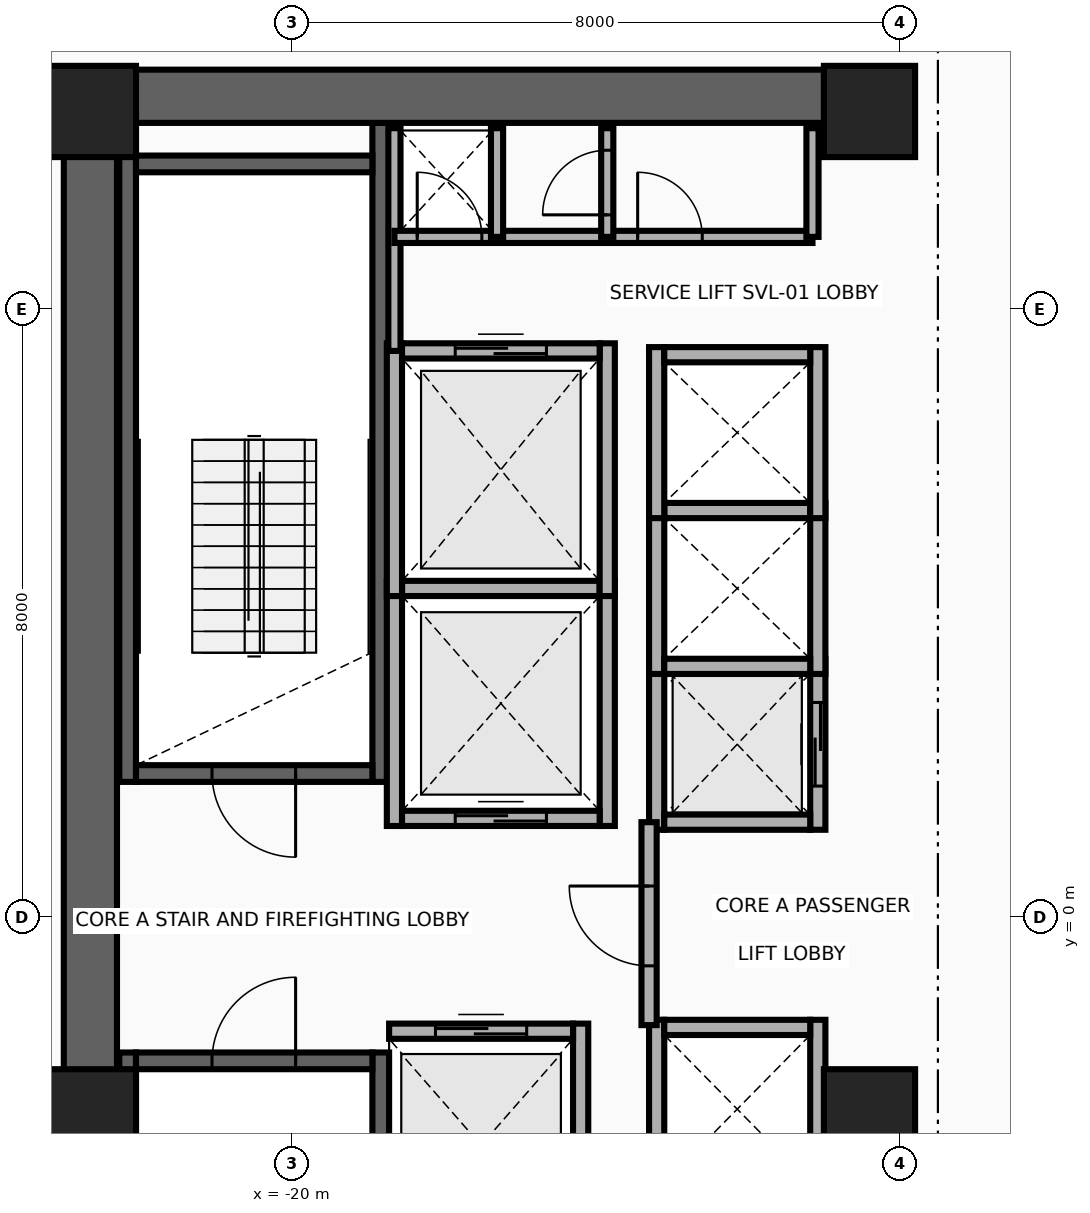
"""IFC4 building model, lengths in metres.
Left out: names, types, materials, properties, quantities, classifications, styles, units other than length and angle.
Written with IfcOpenShell. Run it as: python <this file> out.ifc"""

import sys

from ifc_helpers import new_model, si_unit, direction, frame, frame_2d, origin, origin_2d, place, context, subcontext, project, spatial, rectangle, extrude, source, transform, mapped, element, fill, save


model = new_model("IFC4")
c1 = context("Model", 3, precision=1e-05, world=origin(), true_north=direction((0.0, 1.0)))
c2 = subcontext(c1, "Body", "Model", "MODEL_VIEW")
j1 = project(units=[si_unit("LENGTHUNIT", "METRE"), si_unit("PLANEANGLEUNIT", "RADIAN")], contexts=[c1])
p1 = place(None, origin())
s1 = spatial("IfcSite", under=j1, at=p1, CompositionType="ELEMENT")
p2 = place(p1, origin())
s2 = spatial("IfcBuilding", under=s1, at=p2, CompositionType="ELEMENT")
p3 = place(p2, frame((0.0, 0.0, 135.3)))
s3 = spatial("IfcBuildingStorey", under=s2, at=p3, CompositionType="ELEMENT", Elevation=135.3)
for number, where, z_axis, x_axis in (
    (1, (-22.16, 1.78, 0.0), (0.0, 0.0, 1.0), (0.0, 1.0, 0.0)),
    (2, (-18.83, 1.78, 0.0), (0.0, 0.0, 1.0), (0.0, 1.0, 0.0)),
):
    element("IfcWall", number, at=place(p3, frame(where, z_axis=z_axis, x_axis=x_axis)), inside=s3, PredefinedType="SHEAR", context=c2, shape_type="SweptSolid", body=[
        extrude(rectangle(XDim=8.67, YDim=0.22, at=frame_2d((4.335, 0.0))), origin(), (0.0, 0.0, 1.0), 3.46),
    ])
p4 = place(p3, frame((-22.05, 1.89, 0.0), z_axis=(0.0, 0.0, 1.0), x_axis=(1.0, 0.0, 0.0)))
e3 = element("IfcWall", 3, at=p4, inside=s3, PredefinedType="SHEAR", context=c2, shape_type="SweptSolid", body=[
    extrude(rectangle(XDim=3.11, YDim=0.22, at=frame_2d((1.555, 0.0))), origin(), (0.0, 0.0, 1.0), 3.46),
])
p5 = place(p4, frame((1.0, 0.0, 0.0)))
e4 = element("IfcOpeningElement", 4, at=p5, cuts=e3, PredefinedType="OPENING", context=c2, shape_type="SweptSolid", body=[
    extrude(rectangle(XDim=1.1, YDim=2.15, at=frame_2d((0.55, 1.075))), frame((0.0, 0.125, 0.0), z_axis=(0.0, -1.0, 0.0), x_axis=(1.0, 0.0, 0.0)), (0.0, 0.0, 1.0), 0.25),
])
p6 = place(p3, frame((-22.05, 9.91, 0.0), z_axis=(0.0, 0.0, 1.0), x_axis=(1.0, 0.0, 0.0)))
e5 = element("IfcWall", 5, at=p6, inside=s3, PredefinedType="SHEAR", context=c2, shape_type="SweptSolid", body=[
    extrude(rectangle(XDim=3.11, YDim=0.22, at=frame_2d((1.555, 0.0))), origin(), (0.0, 0.0, 1.0), 3.46),
])
for number, where, z_axis, x_axis in (
    (6, (-22.16, -10.45, 0.0), (0.0, 0.0, 1.0), (0.0, 1.0, 0.0)),
    (7, (-18.83, -10.45, 0.0), (0.0, 0.0, 1.0), (0.0, 1.0, 0.0)),
):
    element("IfcWall", number, at=place(p3, frame(where, z_axis=z_axis, x_axis=x_axis)), inside=s3, PredefinedType="SHEAR", context=c2, shape_type="SweptSolid", body=[
        extrude(rectangle(XDim=8.67, YDim=0.22, at=frame_2d((4.335, 0.0))), origin(), (0.0, 0.0, 1.0), 3.46),
    ])
p7 = place(p3, frame((-22.05, -1.89, 0.0), z_axis=(0.0, 0.0, 1.0), x_axis=(1.0, 0.0, 0.0)))
e8 = element("IfcWall", 8, at=p7, inside=s3, PredefinedType="SHEAR", context=c2, shape_type="SweptSolid", body=[
    extrude(rectangle(XDim=3.11, YDim=0.22, at=frame_2d((1.555, 0.0))), origin(), (0.0, 0.0, 1.0), 3.46),
])
p8 = place(p7, frame((1.0, 0.0, 0.0)))
e9 = element("IfcOpeningElement", 9, at=p8, cuts=e8, PredefinedType="OPENING", context=c2, shape_type="SweptSolid", body=[
    extrude(rectangle(XDim=1.1, YDim=2.15, at=frame_2d((0.55, 1.075))), frame((0.0, 0.125, 0.0), z_axis=(0.0, -1.0, 0.0), x_axis=(1.0, 0.0, 0.0)), (0.0, 0.0, 1.0), 0.25),
])
p9 = place(p3, frame((-22.65, -11.15, 0.0), z_axis=(0.0, 0.0, 1.0), x_axis=(0.0, 1.0, 0.0)))
e10 = element("IfcWall", 10, at=p9, inside=s3, PredefinedType="SHEAR", context=c2, shape_type="SweptSolid", body=[
    extrude(rectangle(XDim=22.3, YDim=0.7, at=frame_2d((11.15, 0.0))), origin(), (0.0, 0.0, 1.0), 3.46),
])
p10 = place(p3, frame((-22.65, 10.8, 0.0), z_axis=(0.0, 0.0, 1.0), x_axis=(1.0, 0.0, 0.0)))
e11 = element("IfcWall", 11, at=p10, inside=s3, PredefinedType="SHEAR", context=c2, shape_type="SweptSolid", body=[
    extrude(rectangle(XDim=10.25, YDim=0.7, at=frame_2d((5.125, 0.0))), origin(), (0.0, 0.0, 1.0), 3.46),
])
m1 = source(origin(), c2, "Body", "SweptSolid", [
    extrude(rectangle(XDim=1.2, YDim=1.2, at=origin_2d()), origin(), (0.0, 0.0, 1.0), 3.7),
])
for number, where, z_axis, x_axis in (
    (12, (-22.65, -2.6, 0.0), (0.0, 0.0, 1.0), (1.0, 0.0, 0.0)),
    (13, (-12.4, -2.6, 0.0), (0.0, 0.0, 1.0), (1.0, 0.0, 0.0)),
    (14, (-22.65, 10.6, 0.0), (0.0, 0.0, 1.0), (1.0, 0.0, 0.0)),
    (15, (-12.4, 10.6, 0.0), (0.0, 0.0, 1.0), (1.0, 0.0, 0.0)),
):
    element("IfcColumn", number, at=place(p3, frame(where, z_axis=z_axis, x_axis=x_axis)), inside=s3, PredefinedType="COLUMN", context=c2, shape_type="MappedRepresentation", body=[
        mapped(m1, transform((0.0, 0.0, 0.0), x_axis=(1.0, 0.0, 0.0), y_axis=(0.0, 1.0, 0.0), z_axis=(0.0, 0.0, 1.0), scale=1.0)),
    ])
for number, where, z_axis, x_axis in (
    (16, (-18.65, 1.2, 0.0), (0.0, 0.0, 1.0), (0.0, 1.0, 0.0)),
    (17, (-15.85, 1.2, 0.0), (0.0, 0.0, 1.0), (0.0, 1.0, 0.0)),
):
    element("IfcWall", number, at=place(p3, frame(where, z_axis=z_axis, x_axis=x_axis)), inside=s3, PredefinedType="MOVABLE", context=c2, shape_type="SweptSolid", body=[
        extrude(rectangle(XDim=3.225, YDim=0.2, at=frame_2d((1.613, 0.0))), origin(), (0.0, 0.0, 1.0), 3.46),
    ])
p11 = place(p3, frame((-18.55, 1.3, 0.0), z_axis=(0.0, 0.0, 1.0), x_axis=(1.0, 0.0, 0.0)))
e18 = element("IfcWall", 18, at=p11, inside=s3, PredefinedType="MOVABLE", context=c2, shape_type="SweptSolid", body=[
    extrude(rectangle(XDim=2.6, YDim=0.2, at=frame_2d((1.3, 0.0))), origin(), (0.0, 0.0, 1.0), 3.46),
])
p12 = place(p11, frame((0.7, 0.0, 0.0)))
e19 = element("IfcOpeningElement", 19, at=p12, cuts=e18, PredefinedType="OPENING", context=c2, shape_type="SweptSolid", body=[
    extrude(rectangle(XDim=1.2, YDim=2.1, at=frame_2d((0.6, 1.05))), frame((0.0, 0.115, 0.0), z_axis=(0.0, -1.0, 0.0), x_axis=(1.0, 0.0, 0.0)), (0.0, 0.0, 1.0), 0.23),
])
p13 = place(p3, frame((-18.55, 4.325, 0.0), z_axis=(0.0, 0.0, 1.0), x_axis=(1.0, 0.0, 0.0)))
e20 = element("IfcWall", 20, at=p13, inside=s3, PredefinedType="MOVABLE", context=c2, shape_type="SweptSolid", body=[
    extrude(rectangle(XDim=2.6, YDim=0.2, at=frame_2d((1.3, 0.0))), origin(), (0.0, 0.0, 1.0), 3.46),
])
p14 = place(p3, frame((-16.2, -4.6, 0.0), z_axis=(0.0, 0.0, 1.0), x_axis=(0.0, 1.0, 0.0)))
e21 = element("IfcWall", 21, at=p14, inside=s3, PredefinedType="MOVABLE", context=c2, shape_type="SweptSolid", body=[
    extrude(rectangle(XDim=3.2, YDim=0.2, at=frame_2d((1.6, 0.0))), origin(), (0.0, 0.0, 1.0), 3.46),
])
p15 = place(p3, frame((-18.72, -1.5, 0.0), z_axis=(0.0, 0.0, 1.0), x_axis=(1.0, 0.0, 0.0)))
e22 = element("IfcWall", 22, at=p15, inside=s3, PredefinedType="MOVABLE", context=c2, shape_type="SweptSolid", body=[
    extrude(rectangle(XDim=2.42, YDim=0.2, at=frame_2d((1.21, 0.0))), origin(), (0.0, 0.0, 1.0), 3.46),
])
p16 = place(p15, frame((0.61, 0.0, 0.0)))
e23 = element("IfcOpeningElement", 23, at=p16, cuts=e22, PredefinedType="OPENING", context=c2, shape_type="SweptSolid", body=[
    extrude(rectangle(XDim=1.2, YDim=2.1, at=frame_2d((0.6, 1.05))), frame((0.0, 0.115, 0.0), z_axis=(0.0, -1.0, 0.0), x_axis=(1.0, 0.0, 0.0)), (0.0, 0.0, 1.0), 0.23),
])
for number, where, z_axis, x_axis in (
    (24, (-18.65, 4.225, 0.0), (0.0, 0.0, 1.0), (0.0, 1.0, 0.0)),
    (25, (-15.85, 4.225, 0.0), (0.0, 0.0, 1.0), (0.0, 1.0, 0.0)),
):
    element("IfcWall", number, at=place(p3, frame(where, z_axis=z_axis, x_axis=x_axis)), inside=s3, PredefinedType="MOVABLE", context=c2, shape_type="SweptSolid", body=[
        extrude(rectangle(XDim=3.325, YDim=0.2, at=frame_2d((1.663, 0.0))), origin(), (0.0, 0.0, 1.0), 3.46),
    ])
p17 = place(p3, frame((-18.55, 7.45, 0.0), z_axis=(0.0, 0.0, 1.0), x_axis=(1.0, 0.0, 0.0)))
e26 = element("IfcWall", 26, at=p17, inside=s3, PredefinedType="MOVABLE", context=c2, shape_type="SweptSolid", body=[
    extrude(rectangle(XDim=2.6, YDim=0.2, at=frame_2d((1.3, 0.0))), origin(), (0.0, 0.0, 1.0), 3.46),
])
p18 = place(p17, frame((0.7, 0.0, 0.0)))
e27 = element("IfcOpeningElement", 27, at=p18, cuts=e26, PredefinedType="OPENING", context=c2, shape_type="SweptSolid", body=[
    extrude(rectangle(XDim=1.2, YDim=2.1, at=frame_2d((0.6, 1.05))), frame((0.0, 0.115, 0.0), z_axis=(0.0, -1.0, 0.0), x_axis=(1.0, 0.0, 0.0)), (0.0, 0.0, 1.0), 0.23),
])
p19 = place(p3, frame((-15.2, 1.15, 0.0), z_axis=(0.0, 0.0, 1.0), x_axis=(0.0, 1.0, 0.0)))
e28 = element("IfcWall", 28, at=p19, inside=s3, PredefinedType="MOVABLE", context=c2, shape_type="SweptSolid", body=[
    extrude(rectangle(XDim=2.25, YDim=0.2, at=frame_2d((1.125, 0.0))), origin(), (0.0, 0.0, 1.0), 3.46),
])
p20 = place(p3, frame((-13.08, 1.15, 0.0), z_axis=(0.0, 0.0, 1.0), x_axis=(0.0, 1.0, 0.0)))
e29 = element("IfcWall", 29, at=p20, inside=s3, PredefinedType="MOVABLE", context=c2, shape_type="SweptSolid", body=[
    extrude(rectangle(XDim=2.25, YDim=0.2, at=frame_2d((1.125, 0.0))), origin(), (0.0, 0.0, 1.0), 3.46),
])
p21 = place(p20, frame((0.575, 0.0, 0.0)))
e30 = element("IfcOpeningElement", 30, at=p21, cuts=e29, PredefinedType="OPENING", context=c2, shape_type="SweptSolid", body=[
    extrude(rectangle(XDim=1.1, YDim=2.1, at=frame_2d((0.55, 1.05))), frame((0.0, 0.115, 0.0), z_axis=(0.0, -1.0, 0.0), x_axis=(1.0, 0.0, 0.0)), (0.0, 0.0, 1.0), 0.23),
])
p22 = place(p3, frame((-15.1, 1.25, 0.0), z_axis=(0.0, 0.0, 1.0), x_axis=(1.0, 0.0, 0.0)))
e31 = element("IfcWall", 31, at=p22, inside=s3, PredefinedType="MOVABLE", context=c2, shape_type="SweptSolid", body=[
    extrude(rectangle(XDim=1.92, YDim=0.2, at=frame_2d((0.96, 0.0))), origin(), (0.0, 0.0, 1.0), 3.46),
])
for number, where, z_axis, x_axis in (
    (32, (-15.2, 3.2, 0.0), (0.0, 0.0, 1.0), (0.0, 1.0, 0.0)),
    (33, (-13.08, 3.2, 0.0), (0.0, 0.0, 1.0), (0.0, 1.0, 0.0)),
):
    element("IfcWall", number, at=place(p3, frame(where, z_axis=z_axis, x_axis=x_axis)), inside=s3, PredefinedType="MOVABLE", context=c2, shape_type="SweptSolid", body=[
        extrude(rectangle(XDim=2.25, YDim=0.2, at=frame_2d((1.125, 0.0))), origin(), (0.0, 0.0, 1.0), 3.46),
    ])
for number, where, z_axis, x_axis in (
    (34, (-15.1, 3.3, 0.0), (0.0, 0.0, 1.0), (1.0, 0.0, 0.0)),
    (35, (-15.1, 5.35, 0.0), (0.0, 0.0, 1.0), (1.0, 0.0, 0.0)),
):
    element("IfcWall", number, at=place(p3, frame(where, z_axis=z_axis, x_axis=x_axis)), inside=s3, PredefinedType="MOVABLE", context=c2, shape_type="SweptSolid", body=[
        extrude(rectangle(XDim=1.92, YDim=0.2, at=frame_2d((0.96, 0.0))), origin(), (0.0, 0.0, 1.0), 3.46),
    ])
for number, where, z_axis, x_axis in (
    (36, (-15.2, 5.25, 0.0), (0.0, 0.0, 1.0), (0.0, 1.0, 0.0)),
    (37, (-13.08, 5.25, 0.0), (0.0, 0.0, 1.0), (0.0, 1.0, 0.0)),
):
    element("IfcWall", number, at=place(p3, frame(where, z_axis=z_axis, x_axis=x_axis)), inside=s3, PredefinedType="MOVABLE", context=c2, shape_type="SweptSolid", body=[
        extrude(rectangle(XDim=2.25, YDim=0.2, at=frame_2d((1.125, 0.0))), origin(), (0.0, 0.0, 1.0), 3.46),
    ])
p23 = place(p3, frame((-15.1, 7.4, 0.0), z_axis=(0.0, 0.0, 1.0), x_axis=(1.0, 0.0, 0.0)))
e38 = element("IfcWall", 38, at=p23, inside=s3, PredefinedType="MOVABLE", context=c2, shape_type="SweptSolid", body=[
    extrude(rectangle(XDim=1.92, YDim=0.2, at=frame_2d((0.96, 0.0))), origin(), (0.0, 0.0, 1.0), 3.46),
])
for number, where, z_axis, x_axis in (
    (39, (-15.2, -3.7, 0.0), (0.0, 0.0, 1.0), (0.0, 1.0, 0.0)),
    (40, (-13.08, -3.7, 0.0), (0.0, 0.0, 1.0), (0.0, 1.0, 0.0)),
):
    element("IfcWall", number, at=place(p3, frame(where, z_axis=z_axis, x_axis=x_axis)), inside=s3, PredefinedType="MOVABLE", context=c2, shape_type="SweptSolid", body=[
        extrude(rectangle(XDim=2.35, YDim=0.2, at=frame_2d((1.175, 0.0))), origin(), (0.0, 0.0, 1.0), 3.46),
    ])
p24 = place(p3, frame((-15.1, -1.45, 0.0), z_axis=(0.0, 0.0, 1.0), x_axis=(1.0, 0.0, 0.0)))
e41 = element("IfcWall", 41, at=p24, inside=s3, PredefinedType="MOVABLE", context=c2, shape_type="SweptSolid", body=[
    extrude(rectangle(XDim=1.92, YDim=0.2, at=frame_2d((0.96, 0.0))), origin(), (0.0, 0.0, 1.0), 3.46),
])
p25 = place(p3, frame((-15.3, -1.42, 0.0), z_axis=(0.0, 0.0, 1.0), x_axis=(0.0, 1.0, 0.0)))
e42 = element("IfcWall", 42, at=p25, inside=s3, PredefinedType="PARTITIONING", context=c2, shape_type="SweptSolid", body=[
    extrude(rectangle(XDim=2.67, YDim=0.2, at=frame_2d((1.335, 0.0))), origin(), (0.0, 0.0, 1.0), 3.46),
])
p26 = place(p25, frame((0.78, 0.0, 0.0)))
e43 = element("IfcOpeningElement", 43, at=p26, cuts=e42, PredefinedType="OPENING", context=c2, shape_type="SweptSolid", body=[
    extrude(rectangle(XDim=1.05, YDim=2.15, at=frame_2d((0.525, 1.075))), frame((0.0, 0.115, 0.0), z_axis=(0.0, -1.0, 0.0), x_axis=(1.0, 0.0, 0.0)), (0.0, 0.0, 1.0), 0.23),
])
p27 = place(p3, frame((-18.65, 7.45, 0.0), z_axis=(0.0, 0.0, 1.0), x_axis=(0.0, 1.0, 0.0)))
e44 = element("IfcWall", 44, at=p27, inside=s3, PredefinedType="PARTITIONING", context=c2, shape_type="SweptSolid", body=[
    extrude(rectangle(XDim=2.93, YDim=0.16, at=frame_2d((1.465, 0.0))), origin(), (0.0, 0.0, 1.0), 3.46),
])
p28 = place(p3, frame((-18.65, 8.95, 0.0), z_axis=(0.0, 0.0, 1.0), x_axis=(1.0, 0.0, 0.0)))
e45 = element("IfcWall", 45, at=p28, inside=s3, PredefinedType="PARTITIONING", context=c2, shape_type="SweptSolid", body=[
    extrude(rectangle(XDim=5.5, YDim=0.16, at=frame_2d((2.75, 0.0))), origin(), (0.0, 0.0, 1.0), 3.46),
])
p29 = place(p28, frame((0.3, 0.0, 0.0)))
e46 = element("IfcOpeningElement", 46, at=p29, cuts=e45, PredefinedType="OPENING", context=c2, shape_type="SweptSolid", body=[
    extrude(rectangle(XDim=0.85, YDim=2.05, at=frame_2d((0.425, 1.025))), frame((0.0, 0.095, 0.0), z_axis=(0.0, -1.0, 0.0), x_axis=(1.0, 0.0, 0.0)), (0.0, 0.0, 1.0), 0.19),
])
p30 = place(p28, frame((3.2, 0.0, 0.0)))
e47 = element("IfcOpeningElement", 47, at=p30, cuts=e45, PredefinedType="OPENING", context=c2, shape_type="SweptSolid", body=[
    extrude(rectangle(XDim=0.85, YDim=2.05, at=frame_2d((0.425, 1.025))), frame((0.0, 0.095, 0.0), z_axis=(0.0, -1.0, 0.0), x_axis=(1.0, 0.0, 0.0)), (0.0, 0.0, 1.0), 0.19),
])
for number, where, z_axis, x_axis in (
    (48, (-13.15, 8.95, 0.0), (0.0, 0.0, 1.0), (0.0, 1.0, 0.0)),
    (49, (-17.3, 8.95, 0.0), (0.0, 0.0, 1.0), (0.0, 1.0, 0.0)),
):
    element("IfcWall", number, at=place(p3, frame(where, z_axis=z_axis, x_axis=x_axis)), inside=s3, PredefinedType="PARTITIONING", context=c2, shape_type="SweptSolid", body=[
        extrude(rectangle(XDim=1.43, YDim=0.16, at=frame_2d((0.715, 0.0))), origin(), (0.0, 0.0, 1.0), 3.46),
    ])
p31 = place(p3, frame((-15.85, 8.95, 0.0), z_axis=(0.0, 0.0, 1.0), x_axis=(0.0, 1.0, 0.0)))
e50 = element("IfcWall", 50, at=p31, inside=s3, PredefinedType="PARTITIONING", context=c2, shape_type="SweptSolid", body=[
    extrude(rectangle(XDim=1.43, YDim=0.16, at=frame_2d((0.715, 0.0))), origin(), (0.0, 0.0, 1.0), 3.46),
])
p32 = place(p31, frame((0.29, 0.0, 0.0)))
e51 = element("IfcOpeningElement", 51, at=p32, cuts=e50, PredefinedType="OPENING", context=c2, shape_type="SweptSolid", body=[
    extrude(rectangle(XDim=0.85, YDim=2.05, at=frame_2d((0.425, 1.025))), frame((0.0, 0.095, 0.0), z_axis=(0.0, -1.0, 0.0), x_axis=(1.0, 0.0, 0.0)), (0.0, 0.0, 1.0), 0.19),
])
p33 = place(p12, origin())
e52 = element("IfcDoor", 52, at=p33, inside=s3, OperationType="DOUBLE_DOOR_SLIDING", PredefinedType="DOOR", context=c2, shape_type="SweptSolid", body=[
    extrude(rectangle(XDim=1.2, YDim=2.1, at=frame_2d((0.6, 1.05))), frame((0.0, 0.025, 0.0), z_axis=(0.0, -1.0, 0.0), x_axis=(1.0, 0.0, 0.0)), (0.0, 0.0, 1.0), 0.05),
])
fill(e19, e52)
p34 = place(p16, origin())
e53 = element("IfcDoor", 53, at=p34, inside=s3, OperationType="DOUBLE_DOOR_SLIDING", PredefinedType="DOOR", context=c2, shape_type="SweptSolid", body=[
    extrude(rectangle(XDim=1.2, YDim=2.1, at=frame_2d((0.6, 1.05))), frame((0.0, 0.025, 0.0), z_axis=(0.0, -1.0, 0.0), x_axis=(1.0, 0.0, 0.0)), (0.0, 0.0, 1.0), 0.05),
])
fill(e23, e53)
p35 = place(p18, origin())
e54 = element("IfcDoor", 54, at=p35, inside=s3, OperationType="DOUBLE_DOOR_SLIDING", PredefinedType="DOOR", context=c2, shape_type="SweptSolid", body=[
    extrude(rectangle(XDim=1.2, YDim=2.1, at=frame_2d((0.6, 1.05))), frame((0.0, 0.025, 0.0), z_axis=(0.0, -1.0, 0.0), x_axis=(1.0, 0.0, 0.0)), (0.0, 0.0, 1.0), 0.05),
])
fill(e27, e54)
p36 = place(p21, origin())
e55 = element("IfcDoor", 55, at=p36, inside=s3, OperationType="DOUBLE_DOOR_SLIDING", PredefinedType="DOOR", context=c2, shape_type="SweptSolid", body=[
    extrude(rectangle(XDim=1.1, YDim=2.1, at=frame_2d((0.55, 1.05))), frame((0.0, 0.025, 0.0), z_axis=(0.0, -1.0, 0.0), x_axis=(1.0, 0.0, 0.0)), (0.0, 0.0, 1.0), 0.05),
])
fill(e30, e55)
p37 = place(p26, origin())
e56 = element("IfcDoor", 56, at=p37, inside=s3, OperationType="SINGLE_SWING_RIGHT", PredefinedType="DOOR", context=c2, shape_type="SweptSolid", body=[
    extrude(rectangle(XDim=1.05, YDim=2.15, at=frame_2d((0.525, 1.075))), frame((0.0, 0.025, 0.0), z_axis=(0.0, -1.0, 0.0), x_axis=(1.0, 0.0, 0.0)), (0.0, 0.0, 1.0), 0.05),
])
fill(e43, e56)
p38 = place(p5, frame((1.1, 0.0, 0.0), z_axis=(0.0, 0.0, 1.0), x_axis=(-1.0, 0.0, 0.0)))
e57 = element("IfcDoor", 57, at=p38, inside=s3, OperationType="SINGLE_SWING_LEFT", PredefinedType="DOOR", context=c2, shape_type="SweptSolid", body=[
    extrude(rectangle(XDim=1.1, YDim=2.15, at=frame_2d((0.55, 1.075))), frame((0.0, 0.025, 0.0), z_axis=(0.0, -1.0, 0.0), x_axis=(1.0, 0.0, 0.0)), (0.0, 0.0, 1.0), 0.05),
])
fill(e4, e57)
p39 = place(p8, origin())
e58 = element("IfcDoor", 58, at=p39, inside=s3, OperationType="SINGLE_SWING_RIGHT", PredefinedType="DOOR", context=c2, shape_type="SweptSolid", body=[
    extrude(rectangle(XDim=1.1, YDim=2.15, at=frame_2d((0.55, 1.075))), frame((0.0, 0.025, 0.0), z_axis=(0.0, -1.0, 0.0), x_axis=(1.0, 0.0, 0.0)), (0.0, 0.0, 1.0), 0.05),
])
fill(e9, e58)
p40 = place(p29, origin())
e59 = element("IfcDoor", 59, at=p40, inside=s3, OperationType="SINGLE_SWING_LEFT", PredefinedType="DOOR", context=c2, shape_type="SweptSolid", body=[
    extrude(rectangle(XDim=0.85, YDim=2.05, at=frame_2d((0.425, 1.025))), frame((0.0, 0.025, 0.0), z_axis=(0.0, -1.0, 0.0), x_axis=(1.0, 0.0, 0.0)), (0.0, 0.0, 1.0), 0.05),
])
fill(e46, e59)
p41 = place(p30, origin())
e60 = element("IfcDoor", 60, at=p41, inside=s3, OperationType="SINGLE_SWING_RIGHT", PredefinedType="DOOR", context=c2, shape_type="SweptSolid", body=[
    extrude(rectangle(XDim=0.85, YDim=2.05, at=frame_2d((0.425, 1.025))), frame((0.0, 0.025, 0.0), z_axis=(0.0, -1.0, 0.0), x_axis=(1.0, 0.0, 0.0)), (0.0, 0.0, 1.0), 0.05),
])
fill(e47, e60)
p42 = place(p32, origin())
e61 = element("IfcDoor", 61, at=p42, inside=s3, OperationType="SINGLE_SWING_LEFT", PredefinedType="DOOR", context=c2, shape_type="SweptSolid", body=[
    extrude(rectangle(XDim=0.85, YDim=2.05, at=frame_2d((0.425, 1.025))), frame((0.0, 0.025, 0.0), z_axis=(0.0, -1.0, 0.0), x_axis=(1.0, 0.0, 0.0)), (0.0, 0.0, 1.0), 0.05),
])
fill(e51, e61)
save(model, sys.argv[1])
